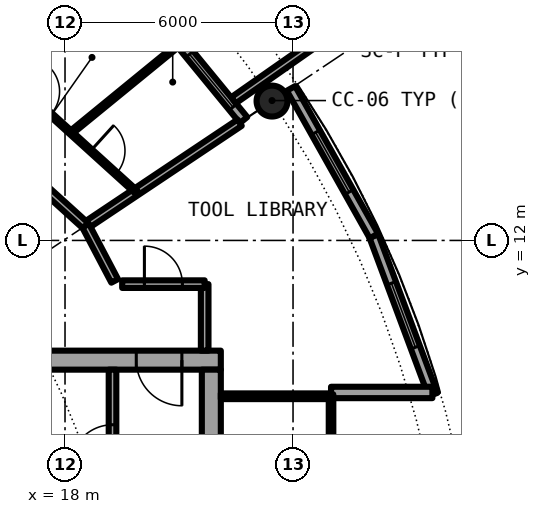
"""IFC4 building model, lengths in metres.
Left out: names, types, materials, properties, quantities, classifications, styles, units other than length and angle.
Written with IfcOpenShell. Run it as: python <this file> out.ifc"""

import sys

from ifc_helpers import new_model, si_unit, direction, frame, frame_2d, origin, origin_2d, place, context, subcontext, project, spatial, rectangle, hollow_circle, extrude, element, fill, save


model = new_model("IFC4")
c1 = context("Model", 3, precision=1e-05, world=origin(), true_north=direction((0.0, 1.0)))
c2 = subcontext(c1, "Body", "Model", "MODEL_VIEW")
j1 = project(units=[si_unit("LENGTHUNIT", "METRE"), si_unit("PLANEANGLEUNIT", "RADIAN")], contexts=[c1])
p1 = place(None, origin())
s1 = spatial("IfcSite", under=j1, at=p1, CompositionType="ELEMENT")
p2 = place(p1, origin())
s2 = spatial("IfcBuilding", under=s1, at=p2, CompositionType="ELEMENT")
p3 = place(p2, frame((0.0, 0.0, 161.6)))
s3 = spatial("IfcBuildingStorey", under=s2, at=p3, CompositionType="ELEMENT", Elevation=161.6)
p4 = place(p3, frame((23.448, 15.667, 0.0), z_axis=(0.0, 0.0, 1.0), x_axis=(1.0, 0.0, 0.0)))
e1 = element("IfcColumn", 1, at=p4, inside=s3, PredefinedType="COLUMN", context=c2, shape_type="SweptSolid", body=[
    extrude(hollow_circle(Radius=0.406, WallThickness=0.04, at=origin_2d()), origin(), (0.0, 0.0, 1.0), 3.05),
])
p5 = place(p3, frame((22.699, 15.167, 0.0), z_axis=(0.0, 0.0, 1.0), x_axis=(-0.634382322723, 0.773019449054, 0.0)))
e2 = element("IfcWall", 2, at=p5, inside=s3, PredefinedType="SOLIDWALL", context=c2, shape_type="SweptSolid", body=[
    extrude(rectangle(XDim=5.352, YDim=0.25, at=frame_2d((2.676, 0.0))), origin(), (0.0, 0.0, 1.0), 2.7),
])
p6 = place(p5, frame((0.441, 0.0, 0.3)))
e3 = element("IfcOpeningElement", 3, at=p6, cuts=e2, PredefinedType="OPENING", context=c2, shape_type="SweptSolid", body=[
    extrude(rectangle(XDim=1.8, YDim=2.1, at=frame_2d((0.9, 1.05))), frame((0.0, 0.135, 0.0), z_axis=(0.0, -1.0, 0.0), x_axis=(1.0, 0.0, 0.0)), (0.0, 0.0, 1.0), 0.27),
])
p7 = place(p5, frame((3.51, 0.0, 0.0)))
e4 = element("IfcOpeningElement", 4, at=p7, cuts=e2, PredefinedType="OPENING", context=c2, shape_type="SweptSolid", body=[
    extrude(rectangle(XDim=1.0, YDim=2.2, at=frame_2d((0.5, 1.1))), frame((0.0, 0.135, 0.0), z_axis=(0.0, -1.0, 0.0), x_axis=(1.0, 0.0, 0.0)), (0.0, 0.0, 1.0), 0.27),
])
p8 = place(p3, frame((22.433, 15.688, -0.03), z_axis=(0.0, 0.0, 1.0), x_axis=(0.819373043115, 0.573260687834, 0.0)))
e5 = element("IfcWall", 5, at=p8, inside=s3, PredefinedType="SOLIDWALL", context=c2, shape_type="SweptSolid", body=[
    extrude(rectangle(XDim=2.925, YDim=0.2, at=frame_2d((1.463, 0.0))), origin(), (0.0, 0.0, 1.0), 2.73),
])
p9 = place(p3, frame((27.682, 7.945, 0.0), z_axis=(0.0, 0.0, 1.0), x_axis=(-0.349247811493, 0.937030397675, 0.0)))
e6 = element("IfcWall", 6, at=p9, inside=s3, PredefinedType="SOLIDWALL", context=c2, shape_type="SweptSolid", body=[
    extrude(rectangle(XDim=4.452, YDim=0.25, at=frame_2d((2.226, 0.0))), origin(), (0.0, 0.0, 1.0), 2.7),
])
p10 = place(p9, frame((1.327, 0.0, 0.3)))
e7 = element("IfcOpeningElement", 7, at=p10, cuts=e6, PredefinedType="OPENING", context=c2, shape_type="SweptSolid", body=[
    extrude(rectangle(XDim=1.8, YDim=2.1, at=frame_2d((0.9, 1.05))), frame((0.0, 0.135, 0.0), z_axis=(0.0, -1.0, 0.0), x_axis=(1.0, 0.0, 0.0)), (0.0, 0.0, 1.0), 0.27),
])
p11 = place(p3, frame((26.127, 12.117, 0.0), z_axis=(0.0, 0.0, 1.0), x_axis=(-0.489696356642, 0.871893042919, 0.0)))
e8 = element("IfcWall", 8, at=p11, inside=s3, PredefinedType="SOLIDWALL", context=c2, shape_type="SweptSolid", body=[
    extrude(rectangle(XDim=4.454, YDim=0.25, at=frame_2d((2.227, 0.0))), origin(), (0.0, 0.0, 1.0), 2.7),
])
p12 = place(p11, frame((1.327, 0.0, 0.3)))
e9 = element("IfcOpeningElement", 9, at=p12, cuts=e8, PredefinedType="OPENING", context=c2, shape_type="SweptSolid", body=[
    extrude(rectangle(XDim=1.8, YDim=2.1, at=frame_2d((0.9, 1.05))), frame((0.0, 0.135, 0.0), z_axis=(0.0, -1.0, 0.0), x_axis=(1.0, 0.0, 0.0)), (0.0, 0.0, 1.0), 0.27),
])
p13 = place(p3, frame((25.0, 8.0, 0.0), z_axis=(0.0, 0.0, 1.0), x_axis=(1.0, 0.0, 0.0)))
e10 = element("IfcWall", 10, at=p13, inside=s3, PredefinedType="SOLIDWALL", context=c2, shape_type="SweptSolid", body=[
    extrude(rectangle(XDim=2.667, YDim=0.3, at=frame_2d((1.333, 0.0))), origin(), (0.0, 0.0, 1.0), 2.7),
])
p14 = place(p3, frame((22.1, 8.85, 0.0), z_axis=(0.0, 0.0, 1.0), x_axis=(-1.0, 0.0, 0.0)))
e11 = element("IfcWall", 11, at=p14, inside=s3, PredefinedType="SHEAR", context=c2, shape_type="SweptSolid", body=[
    extrude(rectangle(XDim=13.6, YDim=0.5, at=frame_2d((6.8, 0.0))), origin(), (0.0, 0.0, 1.0), 3.05),
])
p15 = place(p14, frame((1.025, 0.0, 0.0)))
e12 = element("IfcOpeningElement", 12, at=p15, cuts=e11, PredefinedType="OPENING", context=c2, shape_type="SweptSolid", body=[
    extrude(rectangle(XDim=1.2, YDim=2.3, at=frame_2d((0.6, 1.15))), frame((0.0, 0.26, 0.0), z_axis=(0.0, -1.0, 0.0), x_axis=(1.0, 0.0, 0.0)), (0.0, 0.0, 1.0), 0.52),
])
p16 = place(p3, frame((21.85, 8.6, 0.0), z_axis=(0.0, 0.0, 1.0), x_axis=(0.0, -1.0, 0.0)))
e13 = element("IfcWall", 13, at=p16, inside=s3, PredefinedType="SHEAR", context=c2, shape_type="SweptSolid", body=[
    extrude(rectangle(XDim=17.2, YDim=0.5, at=frame_2d((8.6, 0.0))), origin(), (0.0, 0.0, 1.0), 3.05),
])
p17 = place(p16, frame((7.7, 0.0, 0.0)))
e14 = element("IfcOpeningElement", 14, at=p17, cuts=e13, PredefinedType="OPENING", context=c2, shape_type="SweptSolid", body=[
    extrude(rectangle(XDim=1.8, YDim=2.3, at=frame_2d((0.9, 1.15))), frame((0.0, 0.26, 0.0), z_axis=(0.0, -1.0, 0.0), x_axis=(1.0, 0.0, 0.0)), (0.0, 0.0, 1.0), 0.52),
])
p18 = place(p3, frame((19.25, 1.575, 0.0), z_axis=(0.0, 0.0, 1.0), x_axis=(0.0, 1.0, 0.0)))
e15 = element("IfcWall", 15, at=p18, inside=s3, PredefinedType="SOLIDWALL", context=c2, shape_type="SweptSolid", body=[
    extrude(rectangle(XDim=7.025, YDim=0.2, at=frame_2d((3.513, 0.0))), origin(), (0.0, 0.0, 1.0), 2.7),
])
p19 = place(p18, frame((4.475, 0.0, 0.0)))
e16 = element("IfcOpeningElement", 16, at=p19, cuts=e15, PredefinedType="OPENING", context=c2, shape_type="SweptSolid", body=[
    extrude(rectangle(XDim=1.1, YDim=2.3, at=frame_2d((0.55, 1.15))), frame((0.0, 0.11, 0.0), z_axis=(0.0, -1.0, 0.0), x_axis=(1.0, 0.0, 0.0)), (0.0, 0.0, 1.0), 0.22),
])
p20 = place(p3, frame((22.1, 7.9, 0.0), z_axis=(0.0, 0.0, 1.0), x_axis=(1.0, 0.0, 0.0)))
e17 = element("IfcWall", 17, at=p20, inside=s3, PredefinedType="PARTITIONING", context=c2, shape_type="SweptSolid", body=[
    extrude(rectangle(XDim=2.84, YDim=0.15, at=frame_2d((1.42, 0.0))), origin(), (0.0, 0.0, 1.0), 2.7),
])
p21 = place(p3, frame((25.0, -7.95, 0.0), z_axis=(0.0, 0.0, 1.0), x_axis=(0.0, 1.0, 0.0)))
e18 = element("IfcWall", 18, at=p21, inside=s3, PredefinedType="PARTITIONING", context=c2, shape_type="SweptSolid", body=[
    extrude(rectangle(XDim=15.9, YDim=0.12, at=frame_2d((7.95, 0.0))), origin(), (0.0, 0.0, 1.0), 2.7),
])
p22 = place(p21, frame((0.95, 0.0, 0.1)))
e19 = element("IfcOpeningElement", 19, at=p22, cuts=e18, PredefinedType="OPENING", context=c2, shape_type="SweptSolid", body=[
    extrude(rectangle(XDim=14.0, YDim=2.35, at=frame_2d((7.0, 1.175))), frame((0.0, 0.07, 0.0), z_axis=(0.0, -1.0, 0.0), x_axis=(1.0, 0.0, 0.0)), (0.0, 0.0, 1.0), 0.14),
])
p23 = place(p3, frame((21.675, 9.1, 0.0), z_axis=(0.0, 0.0, 1.0), x_axis=(0.0, 1.0, 0.0)))
e20 = element("IfcWall", 20, at=p23, inside=s3, PredefinedType="PARTITIONING", context=c2, shape_type="SweptSolid", body=[
    extrude(rectangle(XDim=1.75, YDim=0.2, at=frame_2d((0.875, 0.0))), origin(), (0.0, 0.0, 1.0), 2.7),
])
p24 = place(p3, frame((16.43, 16.398, 0.0), z_axis=(0.0, 0.0, 1.0), x_axis=(0.707722727509, 0.706490297858, 0.0)))
e21 = element("IfcWall", 21, at=p24, inside=s3, PredefinedType="PARTITIONING", context=c2, shape_type="SweptSolid", body=[
    extrude(rectangle(XDim=3.962, YDim=0.1, at=frame_2d((1.981, 0.0))), origin(), (0.0, 0.0, 1.0), 2.7),
])
p25 = place(p3, frame((18.154, 14.834, 0.0), z_axis=(0.0, 0.0, 1.0), x_axis=(0.77429537896, 0.632824356454, 0.0)))
e22 = element("IfcWall", 22, at=p25, inside=s3, PredefinedType="PARTITIONING", context=c2, shape_type="SweptSolid", body=[
    extrude(rectangle(XDim=3.731, YDim=0.1, at=frame_2d((1.865, 0.0))), origin(), (0.0, 0.0, 1.0), 2.7),
])
p26 = place(p3, frame((18.542, 12.389, 0.0), z_axis=(0.0, 0.0, 1.0), x_axis=(0.831387096605, 0.55569370664, 0.0)))
e23 = element("IfcWall", 23, at=p26, inside=s3, PredefinedType="PARTITIONING", context=c2, shape_type="SweptSolid", body=[
    extrude(rectangle(XDim=4.875, YDim=0.2, at=frame_2d((2.438, 0.0))), origin(), (0.0, 0.0, 1.0), 2.7),
])
p27 = place(p3, frame((19.504, 10.85, 0.0), z_axis=(0.0, 0.0, 1.0), x_axis=(1.0, 0.0, 0.0)))
e24 = element("IfcWall", 24, at=p27, inside=s3, PredefinedType="PARTITIONING", context=c2, shape_type="SweptSolid", body=[
    extrude(rectangle(XDim=2.171, YDim=0.2, at=frame_2d((1.085, 0.0))), origin(), (0.0, 0.0, 1.0), 2.7),
])
p28 = place(p27, frame((0.585, 0.0, 0.0)))
e25 = element("IfcOpeningElement", 25, at=p28, cuts=e24, PredefinedType="OPENING", context=c2, shape_type="SweptSolid", body=[
    extrude(rectangle(XDim=1.0, YDim=2.3, at=frame_2d((0.5, 1.15))), frame((0.0, 0.11, 0.0), z_axis=(0.0, -1.0, 0.0), x_axis=(1.0, 0.0, 0.0)), (0.0, 0.0, 1.0), 0.22),
])
p29 = place(p3, frame((10.512, 19.667, 0.0), z_axis=(0.0, 0.0, 1.0), x_axis=(0.740849323054, -0.67167125927, 0.0)))
e26 = element("IfcWall", 26, at=p29, inside=s3, PredefinedType="PARTITIONING", context=c2, shape_type="SweptSolid", body=[
    extrude(rectangle(XDim=10.842, YDim=0.2, at=frame_2d((5.421, 0.0))), origin(), (0.0, 0.0, 1.0), 2.7),
])
p30 = place(p29, frame((6.003, 0.0, 0.0)))
e27 = element("IfcOpeningElement", 27, at=p30, cuts=e26, PredefinedType="OPENING", context=c2, shape_type="SweptSolid", body=[
    extrude(rectangle(XDim=1.0, YDim=2.3, at=frame_2d((0.5, 1.15))), frame((0.0, 0.11, 0.0), z_axis=(0.0, -1.0, 0.0), x_axis=(1.0, 0.0, 0.0)), (0.0, 0.0, 1.0), 0.22),
])
p31 = place(p3, frame((18.542, 12.389, 0.0), z_axis=(0.0, 0.0, 1.0), x_axis=(0.465605550524, -0.884992356646, 0.0)))
e28 = element("IfcWall", 28, at=p31, inside=s3, PredefinedType="PARTITIONING", context=c2, shape_type="SweptSolid", body=[
    extrude(rectangle(XDim=1.643, YDim=0.2, at=frame_2d((0.821, 0.0))), origin(), (0.0, 0.0, 1.0), 2.7),
])
p32 = place(p3, frame((14.709, 17.958, 0.0), z_axis=(0.0, 0.0, 1.0), x_axis=(0.740923753351, -0.671589153962, 0.0)))
e29 = element("IfcWall", 29, at=p32, inside=s3, PredefinedType="PARTITIONING", context=c2, shape_type="SweptSolid", body=[
    extrude(rectangle(XDim=6.969, YDim=0.1, at=frame_2d((3.484, 0.0))), origin(), (0.0, 0.0, 1.0), 2.7),
])
p33 = place(p32, frame((3.034, 0.0, 0.0)))
e30 = element("IfcOpeningElement", 30, at=p33, cuts=e29, PredefinedType="OPENING", context=c2, shape_type="SweptSolid", body=[
    extrude(rectangle(XDim=0.9, YDim=2.3, at=frame_2d((0.45, 1.15))), frame((0.0, 0.06, 0.0), z_axis=(0.0, -1.0, 0.0), x_axis=(1.0, 0.0, 0.0)), (0.0, 0.0, 1.0), 0.12),
])
p34 = place(p32, frame((5.357, 0.0, 0.0)))
e31 = element("IfcOpeningElement", 31, at=p34, cuts=e29, PredefinedType="OPENING", context=c2, shape_type="SweptSolid", body=[
    extrude(rectangle(XDim=0.9, YDim=2.3, at=frame_2d((0.45, 1.15))), frame((0.0, 0.06, 0.0), z_axis=(0.0, -1.0, 0.0), x_axis=(1.0, 0.0, 0.0)), (0.0, 0.0, 1.0), 0.12),
])
p35 = place(p6, origin())
e32 = element("IfcWindow", 32, at=p35, inside=s3, PartitioningType="SINGLE_PANEL", PredefinedType="WINDOW", context=c2, shape_type="SweptSolid", body=[
    extrude(rectangle(XDim=1.8, YDim=2.1, at=frame_2d((0.9, 1.05))), frame((0.0, 0.03, 0.0), z_axis=(0.0, -1.0, 0.0), x_axis=(1.0, 0.0, 0.0)), (0.0, 0.0, 1.0), 0.06),
])
fill(e3, e32)
p36 = place(p10, origin())
e33 = element("IfcWindow", 33, at=p36, inside=s3, PartitioningType="SINGLE_PANEL", PredefinedType="WINDOW", context=c2, shape_type="SweptSolid", body=[
    extrude(rectangle(XDim=1.8, YDim=2.1, at=frame_2d((0.9, 1.05))), frame((0.0, 0.03, 0.0), z_axis=(0.0, -1.0, 0.0), x_axis=(1.0, 0.0, 0.0)), (0.0, 0.0, 1.0), 0.06),
])
fill(e7, e33)
p37 = place(p12, origin())
e34 = element("IfcWindow", 34, at=p37, inside=s3, PartitioningType="SINGLE_PANEL", PredefinedType="WINDOW", context=c2, shape_type="SweptSolid", body=[
    extrude(rectangle(XDim=1.8, YDim=2.1, at=frame_2d((0.9, 1.05))), frame((0.0, 0.03, 0.0), z_axis=(0.0, -1.0, 0.0), x_axis=(1.0, 0.0, 0.0)), (0.0, 0.0, 1.0), 0.06),
])
fill(e9, e34)
p38 = place(p19, origin())
e35 = element("IfcDoor", 35, at=p38, inside=s3, OperationType="SINGLE_SWING_LEFT", PredefinedType="DOOR", context=c2, shape_type="SweptSolid", body=[
    extrude(rectangle(XDim=1.1, YDim=2.3, at=frame_2d((0.55, 1.15))), frame((0.0, 0.025, 0.0), z_axis=(0.0, -1.0, 0.0), x_axis=(1.0, 0.0, 0.0)), (0.0, 0.0, 1.0), 0.05),
])
fill(e16, e35)
p39 = place(p15, origin())
e36 = element("IfcDoor", 36, at=p39, inside=s3, OperationType="SINGLE_SWING_RIGHT", PredefinedType="DOOR", context=c2, shape_type="SweptSolid", body=[
    extrude(rectangle(XDim=1.2, YDim=2.3, at=frame_2d((0.6, 1.15))), frame((0.0, 0.025, 0.0), z_axis=(0.0, -1.0, 0.0), x_axis=(1.0, 0.0, 0.0)), (0.0, 0.0, 1.0), 0.05),
])
fill(e12, e36)
p40 = place(p22, origin())
e37 = element("IfcWindow", 37, at=p40, inside=s3, PartitioningType="SINGLE_PANEL", PredefinedType="WINDOW", context=c2, shape_type="SweptSolid", body=[
    extrude(rectangle(XDim=14.0, YDim=2.35, at=frame_2d((7.0, 1.175))), frame((0.0, 0.03, 0.0), z_axis=(0.0, -1.0, 0.0), x_axis=(1.0, 0.0, 0.0)), (0.0, 0.0, 1.0), 0.06),
])
fill(e19, e37)
p41 = place(p34, origin())
e38 = element("IfcDoor", 38, at=p41, inside=s3, OperationType="SINGLE_SWING_RIGHT", PredefinedType="DOOR", context=c2, shape_type="SweptSolid", body=[
    extrude(rectangle(XDim=0.9, YDim=2.3, at=frame_2d((0.45, 1.15))), frame((0.0, 0.025, 0.0), z_axis=(0.0, -1.0, 0.0), x_axis=(1.0, 0.0, 0.0)), (0.0, 0.0, 1.0), 0.05),
])
fill(e31, e38)
p42 = place(p28, origin())
e39 = element("IfcDoor", 39, at=p42, inside=s3, OperationType="SINGLE_SWING_LEFT", PredefinedType="DOOR", context=c2, shape_type="SweptSolid", body=[
    extrude(rectangle(XDim=1.0, YDim=2.3, at=frame_2d((0.5, 1.15))), frame((0.0, 0.025, 0.0), z_axis=(0.0, -1.0, 0.0), x_axis=(1.0, 0.0, 0.0)), (0.0, 0.0, 1.0), 0.05),
])
fill(e25, e39)
save(model, sys.argv[1])
